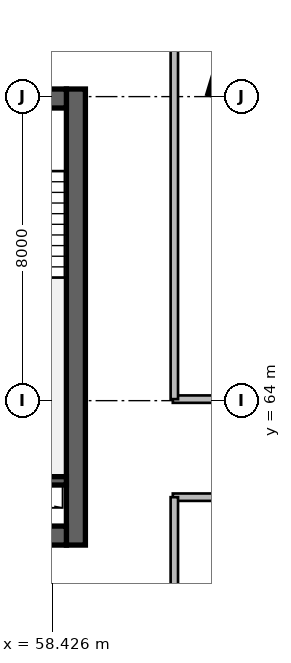
"""IFC4 building model, lengths in metres.
Left out: names, types, materials, properties, quantities, classifications, styles, units other than length and angle.
Written with IfcOpenShell. Run it as: python <this file> out.ifc"""

import sys

from ifc_helpers import new_model, si_unit, direction, frame, frame_2d, origin, origin_2d, place, context, subcontext, project, spatial, rectangle, extrude, source, transform, mapped, element, save


model = new_model("IFC4")
c1 = context("Model", 3, precision=1e-05, world=origin(), true_north=direction((0.0, 1.0)))
c2 = subcontext(c1, "Body", "Model", "MODEL_VIEW")
j1 = project(units=[si_unit("LENGTHUNIT", "METRE"), si_unit("PLANEANGLEUNIT", "RADIAN")], contexts=[c1])
p1 = place(None, origin())
s1 = spatial("IfcSite", under=j1, at=p1, CompositionType="ELEMENT")
p2 = place(p1, origin())
s2 = spatial("IfcBuilding", under=s1, at=p2, CompositionType="ELEMENT")
p3 = place(p2, frame((0.0, 0.0, 162.3)))
s3 = spatial("IfcBuildingStorey", under=s2, at=p3, CompositionType="ELEMENT", Elevation=162.3)
m1 = source(origin(), c2, "Body", "SweptSolid", [
    extrude(rectangle(XDim=12.0, YDim=0.5, at=frame_2d((6.0, 0.0))), origin(), (0.0, 0.0, 1.0), 3.9),
])
p4 = place(p3, frame((59.05, 60.2, 0.0), z_axis=(0.0, 0.0, 1.0), x_axis=(0.0, 1.0, 0.0)))
e1 = element("IfcWall", 1, at=p4, inside=s3, PredefinedType="SHEAR", context=c2, shape_type="MappedRepresentation", body=[
    mapped(m1, transform((0.0, 0.0, 0.0), scale=1.0)),
])
m2 = source(origin(), c2, "Body", "SweptSolid", [
    extrude(rectangle(XDim=21.6, YDim=0.5, at=frame_2d((10.8, 0.0))), origin(), (0.0, 0.0, 1.0), 3.9),
])
p5 = place(p3, frame((37.2, 60.45, 0.0), z_axis=(0.0, 0.0, 1.0), x_axis=(1.0, 0.0, 0.0)))
e2 = element("IfcWall", 2, at=p5, inside=s3, PredefinedType="SHEAR", context=c2, shape_type="MappedRepresentation", body=[
    mapped(m2, transform((0.0, 0.0, 0.0), scale=1.0)),
])
p6 = place(p5, frame((1.1, 0.0, 0.0)))
e3 = element("IfcOpeningElement", 3, at=p6, cuts=e2, PredefinedType="OPENING", context=c2, shape_type="SweptSolid", body=[
    extrude(rectangle(XDim=1.15, YDim=2.15, at=frame_2d((0.575, 1.075))), frame((0.0, 0.26, 0.0), z_axis=(0.0, -1.0, 0.0), x_axis=(1.0, 0.0, 0.0)), (0.0, 0.0, 1.0), 0.52),
])
p7 = place(p5, frame((19.5, 0.0, 0.0)))
e4 = element("IfcOpeningElement", 4, at=p7, cuts=e2, PredefinedType="OPENING", context=c2, shape_type="SweptSolid", body=[
    extrude(rectangle(XDim=0.9, YDim=2.1, at=frame_2d((0.45, 1.05))), frame((0.0, 0.26, 0.0), z_axis=(0.0, -1.0, 0.0), x_axis=(1.0, 0.0, 0.0)), (0.0, 0.0, 1.0), 0.52),
])
p8 = place(p5, frame((12.02, 0.0, 0.0)))
e5 = element("IfcOpeningElement", 5, at=p8, cuts=e2, PredefinedType="OPENING", context=c2, shape_type="SweptSolid", body=[
    extrude(rectangle(XDim=1.6, YDim=2.15, at=frame_2d((0.8, 1.075))), frame((0.0, 0.26, 0.0), z_axis=(0.0, -1.0, 0.0), x_axis=(1.0, 0.0, 0.0)), (0.0, 0.0, 1.0), 0.52),
])
p9 = place(p3, frame((37.2, 71.95, 0.0), z_axis=(0.0, 0.0, 1.0), x_axis=(1.0, 0.0, 0.0)))
e6 = element("IfcWall", 6, at=p9, inside=s3, PredefinedType="SHEAR", context=c2, shape_type="MappedRepresentation", body=[
    mapped(m2, transform((0.0, 0.0, 0.0), scale=1.0)),
])
p10 = place(p9, frame((1.2, 0.0, 0.0)))
e7 = element("IfcOpeningElement", 7, at=p10, cuts=e6, PredefinedType="OPENING", context=c2, shape_type="SweptSolid", body=[
    extrude(rectangle(XDim=0.9, YDim=2.1, at=frame_2d((0.45, 1.05))), frame((0.0, 0.26, 0.0), z_axis=(0.0, -1.0, 0.0), x_axis=(1.0, 0.0, 0.0)), (0.0, 0.0, 1.0), 0.52),
])
p11 = place(p9, frame((14.7, 0.0, 0.0)))
e8 = element("IfcOpeningElement", 8, at=p11, cuts=e6, PredefinedType="OPENING", context=c2, shape_type="SweptSolid", body=[
    extrude(rectangle(XDim=1.2, YDim=2.15, at=frame_2d((0.6, 1.075))), frame((0.0, 0.26, 0.0), z_axis=(0.0, -1.0, 0.0), x_axis=(1.0, 0.0, 0.0)), (0.0, 0.0, 1.0), 0.52),
])
p12 = place(p9, frame((4.15, 0.0, 0.0)))
e9 = element("IfcOpeningElement", 9, at=p12, cuts=e6, PredefinedType="OPENING", context=c2, shape_type="SweptSolid", body=[
    extrude(rectangle(XDim=1.3, YDim=2.15, at=frame_2d((0.65, 1.075))), frame((0.0, 0.26, 0.0), z_axis=(0.0, -1.0, 0.0), x_axis=(1.0, 0.0, 0.0)), (0.0, 0.0, 1.0), 0.52),
])
p13 = place(p9, frame((7.1, 0.0, 0.0)))
e10 = element("IfcOpeningElement", 10, at=p13, cuts=e6, PredefinedType="OPENING", context=c2, shape_type="SweptSolid", body=[
    extrude(rectangle(XDim=0.9, YDim=2.1, at=frame_2d((0.45, 1.05))), frame((0.0, 0.26, 0.0), z_axis=(0.0, -1.0, 0.0), x_axis=(1.0, 0.0, 0.0)), (0.0, 0.0, 1.0), 0.52),
])
m3 = source(origin(), c2, "Body", "SweptSolid", [
    extrude(rectangle(XDim=3.27, YDim=0.22, at=frame_2d((1.635, 0.0))), origin(), (0.0, 0.0, 1.0), 3.9),
])
p14 = place(p3, frame((55.53, 61.89, 0.0), z_axis=(0.0, 0.0, 1.0), x_axis=(1.0, 0.0, 0.0)))
e11 = element("IfcWall", 11, at=p14, inside=s3, PredefinedType="SHEAR", context=c2, shape_type="MappedRepresentation", body=[
    mapped(m3, transform((0.0, 0.0, 0.0), scale=1.0)),
])
m4 = source(origin(), c2, "Body", "SweptSolid", [
    extrude(rectangle(XDim=1.1, YDim=1.1, at=origin_2d()), origin(), (0.0, 0.0, 1.0), 3.9),
])
p15 = place(p3, frame((63.209, 72.442, 0.0), z_axis=(0.0, 0.0, 1.0), x_axis=(0.288697611798, 0.957420330337, 0.0)))
e12 = element("IfcColumn", 12, at=p15, inside=s3, PredefinedType="COLUMN", context=c2, shape_type="MappedRepresentation", body=[
    mapped(m4, transform((0.0, 0.0, 0.0), scale=1.0)),
])
m5 = source(origin(), c2, "Body", "SweptSolid", [
    extrude(rectangle(XDim=11.22, YDim=0.195, at=frame_2d((5.61, 0.0))), origin(), (0.0, 0.0, 1.0), 3.65),
])
p16 = place(p3, frame((61.6, 64.04, 0.0), z_axis=(0.0, 0.0, 1.0), x_axis=(1.0, 0.0, 0.0)))
e13 = element("IfcWall", 13, at=p16, inside=s3, PredefinedType="PARTITIONING", context=c2, shape_type="MappedRepresentation", body=[
    mapped(m5, transform((0.0, 0.0, 0.0), scale=1.0)),
])
p17 = place(p16, frame((5.135, 0.0, 0.0)))
e14 = element("IfcOpeningElement", 14, at=p17, cuts=e13, PredefinedType="OPENING", context=c2, shape_type="SweptSolid", body=[
    extrude(rectangle(XDim=0.95, YDim=2.1, at=frame_2d((0.475, 1.05))), frame((0.0, 0.107, 0.0), z_axis=(0.0, -1.0, 0.0), x_axis=(1.0, 0.0, 0.0)), (0.0, 0.0, 1.0), 0.215),
])
p18 = place(p3, frame((61.6, 61.46, 0.0), z_axis=(0.0, 0.0, 1.0), x_axis=(1.0, 0.0, 0.0)))
e15 = element("IfcWall", 15, at=p18, inside=s3, PredefinedType="PARTITIONING", context=c2, shape_type="MappedRepresentation", body=[
    mapped(m5, transform((0.0, 0.0, 0.0), scale=1.0)),
])
p19 = place(p18, frame((5.135, 0.0, 0.0)))
e16 = element("IfcOpeningElement", 16, at=p19, cuts=e15, PredefinedType="OPENING", context=c2, shape_type="SweptSolid", body=[
    extrude(rectangle(XDim=0.95, YDim=2.1, at=frame_2d((0.475, 1.05))), frame((0.0, 0.107, 0.0), z_axis=(0.0, -1.0, 0.0), x_axis=(1.0, 0.0, 0.0)), (0.0, 0.0, 1.0), 0.215),
])
m6 = source(origin(), c2, "Body", "SweptSolid", [
    extrude(rectangle(XDim=12.126, YDim=0.195, at=frame_2d((6.063, 0.0))), origin(), (0.0, 0.0, 1.0), 2.942),
])
p20 = place(p3, frame((61.64, 49.334, 0.0), z_axis=(0.0, 0.0, 1.0), x_axis=(0.0, 1.0, 0.0)))
e17 = element("IfcWall", 17, at=p20, inside=s3, PredefinedType="PARTITIONING", context=c2, shape_type="MappedRepresentation", body=[
    mapped(m6, transform((0.0, 0.0, 0.0), scale=1.0)),
])
m7 = source(origin(), c2, "Body", "SweptSolid", [
    extrude(rectangle(XDim=10.346, YDim=0.195, at=frame_2d((5.173, 0.0))), origin(), (0.0, 0.0, 1.0), 3.65),
])
p21 = place(p3, frame((61.64, 64.04, 0.0), z_axis=(0.0, 0.0, 1.0), x_axis=(0.0, 1.0, 0.0)))
e18 = element("IfcWall", 18, at=p21, inside=s3, PredefinedType="PARTITIONING", context=c2, shape_type="MappedRepresentation", body=[
    mapped(m7, transform((0.0, 0.0, 0.0), scale=1.0)),
])
save(model, sys.argv[1])
